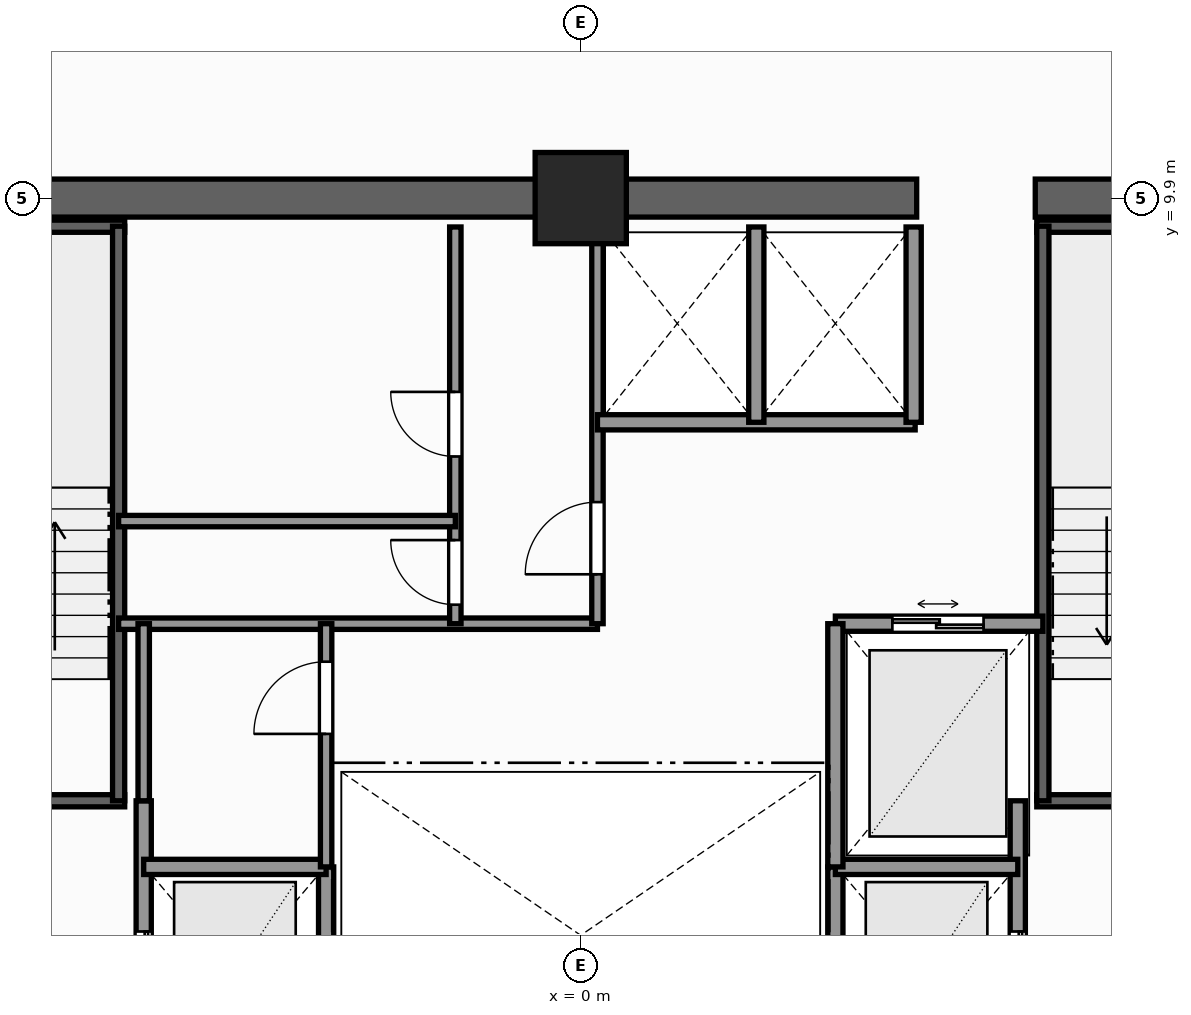
"""IFC4 building model, lengths in metres.
Left out: names, types, materials, properties, quantities, classifications, styles, units other than length and angle.
Written with IfcOpenShell. Run it as: python <this file> out.ifc"""

import sys

from ifc_helpers import new_model, si_unit, direction, frame, frame_2d, origin, origin_2d, place, context, subcontext, project, spatial, rectangle, extrude, element, fill, save


model = new_model("IFC4")
c1 = context("Model", 3, precision=1e-05, world=origin(), true_north=direction((0.0, 1.0)))
c2 = subcontext(c1, "Body", "Model", "MODEL_VIEW")
j1 = project(units=[si_unit("LENGTHUNIT", "METRE"), si_unit("PLANEANGLEUNIT", "RADIAN")], contexts=[c1])
p1 = place(None, origin())
s1 = spatial("IfcSite", under=j1, at=p1, CompositionType="ELEMENT")
p2 = place(p1, origin())
s2 = spatial("IfcBuilding", under=s1, at=p2, CompositionType="ELEMENT")
p3 = place(p2, frame((0.0, 0.0, 131.6)))
s3 = spatial("IfcBuildingStorey", under=s2, at=p3, CompositionType="ELEMENT", Elevation=131.6)
p4 = place(p3, frame((-10.15, 9.9, 0.0), z_axis=(0.0, 0.0, 1.0), x_axis=(1.0, 0.0, 0.0)))
e1 = element("IfcWall", 1, at=p4, inside=s3, PredefinedType="SHEAR", context=c2, shape_type="SweptSolid", body=[
    extrude(rectangle(XDim=14.57, YDim=0.5, at=frame_2d((7.285, 0.0))), origin(), (0.0, 0.0, 1.0), 3.3),
])
p5 = place(p3, frame((5.98, 9.9, 0.0), z_axis=(0.0, 0.0, 1.0), x_axis=(1.0, 0.0, 0.0)))
e2 = element("IfcWall", 2, at=p5, inside=s3, PredefinedType="SHEAR", context=c2, shape_type="SweptSolid", body=[
    extrude(rectangle(XDim=4.17, YDim=0.5, at=frame_2d((2.085, 0.0))), origin(), (0.0, 0.0, 1.0), 3.3),
])
p6 = place(p3, frame((0.0, 9.9, 0.0), z_axis=(0.0, 0.0, 1.0), x_axis=(1.0, 0.0, 0.0)))
e3 = element("IfcColumn", 3, at=p6, inside=s3, PredefinedType="COLUMN", context=c2, shape_type="SweptSolid", body=[
    extrude(rectangle(XDim=1.2, YDim=1.2, at=origin_2d()), origin(), (0.0, 0.0, 1.0), 3.3),
])
p7 = place(p3, frame((-9.52, 1.97, 0.0), z_axis=(0.0, 0.0, 1.0), x_axis=(1.0, 0.0, 0.0)))
e4 = element("IfcWall", 4, at=p7, inside=s3, PredefinedType="SHEAR", context=c2, shape_type="SweptSolid", body=[
    extrude(rectangle(XDim=3.52, YDim=0.16, at=frame_2d((1.76, 0.0))), origin(), (0.0, 0.0, 1.0), 3.3),
])
p8 = place(p7, frame((1.15, 0.0, 0.0)))
e5 = element("IfcOpeningElement", 5, at=p8, cuts=e4, PredefinedType="OPENING", context=c2, shape_type="SweptSolid", body=[
    extrude(rectangle(XDim=1.1, YDim=2.2, at=frame_2d((0.55, 1.1))), frame((0.0, 0.09, 0.0), z_axis=(0.0, -1.0, 0.0), x_axis=(1.0, 0.0, 0.0)), (0.0, 0.0, 1.0), 0.18),
])
p9 = place(p3, frame((-9.52, 9.53, 0.0), z_axis=(0.0, 0.0, 1.0), x_axis=(1.0, 0.0, 0.0)))
e6 = element("IfcWall", 6, at=p9, inside=s3, PredefinedType="SHEAR", context=c2, shape_type="SweptSolid", body=[
    extrude(rectangle(XDim=3.52, YDim=0.16, at=frame_2d((1.76, 0.0))), origin(), (0.0, 0.0, 1.0), 3.3),
])
p10 = place(p3, frame((-6.08, 1.97, 0.0), z_axis=(0.0, 0.0, 1.0), x_axis=(0.0, 1.0, 0.0)))
e7 = element("IfcWall", 7, at=p10, inside=s3, PredefinedType="SHEAR", context=c2, shape_type="SweptSolid", body=[
    extrude(rectangle(XDim=7.56, YDim=0.16, at=frame_2d((3.78, 0.0))), origin(), (0.0, 0.0, 1.0), 3.3),
])
p11 = place(p3, frame((6.0, 1.97, 0.0), z_axis=(0.0, 0.0, 1.0), x_axis=(1.0, 0.0, 0.0)))
e8 = element("IfcWall", 8, at=p11, inside=s3, PredefinedType="SHEAR", context=c2, shape_type="SweptSolid", body=[
    extrude(rectangle(XDim=3.52, YDim=0.16, at=frame_2d((1.76, 0.0))), origin(), (0.0, 0.0, 1.0), 3.3),
])
p12 = place(p11, frame((1.15, 0.0, 0.0)))
e9 = element("IfcOpeningElement", 9, at=p12, cuts=e8, PredefinedType="OPENING", context=c2, shape_type="SweptSolid", body=[
    extrude(rectangle(XDim=1.1, YDim=2.2, at=frame_2d((0.55, 1.1))), frame((0.0, 0.09, 0.0), z_axis=(0.0, -1.0, 0.0), x_axis=(1.0, 0.0, 0.0)), (0.0, 0.0, 1.0), 0.18),
])
p13 = place(p3, frame((6.0, 9.53, 0.0), z_axis=(0.0, 0.0, 1.0), x_axis=(1.0, 0.0, 0.0)))
e10 = element("IfcWall", 10, at=p13, inside=s3, PredefinedType="SHEAR", context=c2, shape_type="SweptSolid", body=[
    extrude(rectangle(XDim=3.52, YDim=0.16, at=frame_2d((1.76, 0.0))), origin(), (0.0, 0.0, 1.0), 3.3),
])
p14 = place(p3, frame((6.08, 1.97, 0.0), z_axis=(0.0, 0.0, 1.0), x_axis=(0.0, 1.0, 0.0)))
e11 = element("IfcWall", 11, at=p14, inside=s3, PredefinedType="SHEAR", context=c2, shape_type="SweptSolid", body=[
    extrude(rectangle(XDim=7.56, YDim=0.16, at=frame_2d((3.78, 0.0))), origin(), (0.0, 0.0, 1.0), 3.3),
])
p15 = place(p3, frame((-5.75, -3.6, 0.0), z_axis=(0.0, 0.0, 1.0), x_axis=(0.0, 1.0, 0.0)))
e12 = element("IfcWall", 12, at=p15, inside=s3, PredefinedType="SOLIDWALL", context=c2, shape_type="SweptSolid", body=[
    extrude(rectangle(XDim=5.57, YDim=0.2, at=frame_2d((2.785, 0.0))), origin(), (0.0, 0.0, 1.0), 2.735),
])
p16 = place(p15, frame((2.75, 0.0, 0.0)))
e13 = element("IfcOpeningElement", 13, at=p16, cuts=e12, PredefinedType="OPENING", context=c2, shape_type="SweptSolid", body=[
    extrude(rectangle(XDim=1.1, YDim=2.2, at=frame_2d((0.55, 1.1))), frame((0.0, 0.11, 0.0), z_axis=(0.0, -1.0, 0.0), x_axis=(1.0, 0.0, 0.0)), (0.0, 0.0, 1.0), 0.22),
])
p17 = place(p3, frame((-3.35, -1.7, 0.0), z_axis=(0.0, 0.0, 1.0), x_axis=(0.0, 1.0, 0.0)))
e14 = element("IfcWall", 14, at=p17, inside=s3, PredefinedType="SOLIDWALL", context=c2, shape_type="SweptSolid", body=[
    extrude(rectangle(XDim=2.8, YDim=0.2, at=frame_2d((1.4, 0.0))), origin(), (0.0, 0.0, 1.0), 2.735),
])
p18 = place(p3, frame((-5.75, 1.1, 0.0), z_axis=(0.0, 0.0, 1.0), x_axis=(1.0, 0.0, 0.0)))
e15 = element("IfcWall", 15, at=p18, inside=s3, PredefinedType="SOLIDWALL", context=c2, shape_type="SweptSolid", body=[
    extrude(rectangle(XDim=2.4, YDim=0.2, at=frame_2d((1.2, 0.0))), origin(), (0.0, 0.0, 1.0), 3.1),
])
p19 = place(p3, frame((5.75, -3.6, 0.0), z_axis=(0.0, 0.0, 1.0), x_axis=(0.0, 1.0, 0.0)))
e16 = element("IfcWall", 16, at=p19, inside=s3, PredefinedType="SOLIDWALL", context=c2, shape_type="SweptSolid", body=[
    extrude(rectangle(XDim=5.57, YDim=0.2, at=frame_2d((2.785, 0.0))), origin(), (0.0, 0.0, 1.0), 2.735),
])
p20 = place(p19, frame((2.75, 0.0, 0.0)))
e17 = element("IfcOpeningElement", 17, at=p20, cuts=e16, PredefinedType="OPENING", context=c2, shape_type="SweptSolid", body=[
    extrude(rectangle(XDim=1.1, YDim=2.2, at=frame_2d((0.55, 1.1))), frame((0.0, 0.11, 0.0), z_axis=(0.0, -1.0, 0.0), x_axis=(1.0, 0.0, 0.0)), (0.0, 0.0, 1.0), 0.22),
])
p21 = place(p3, frame((3.35, -1.7, 0.0), z_axis=(0.0, 0.0, 1.0), x_axis=(0.0, 1.0, 0.0)))
e18 = element("IfcWall", 18, at=p21, inside=s3, PredefinedType="SOLIDWALL", context=c2, shape_type="SweptSolid", body=[
    extrude(rectangle(XDim=2.8, YDim=0.2, at=frame_2d((1.4, 0.0))), origin(), (0.0, 0.0, 1.0), 2.735),
])
p22 = place(p3, frame((3.35, 1.1, 0.0), z_axis=(0.0, 0.0, 1.0), x_axis=(1.0, 0.0, 0.0)))
e19 = element("IfcWall", 19, at=p22, inside=s3, PredefinedType="SOLIDWALL", context=c2, shape_type="SweptSolid", body=[
    extrude(rectangle(XDim=2.4, YDim=0.2, at=frame_2d((1.2, 0.0))), origin(), (0.0, 0.0, 1.0), 3.1),
])
p23 = place(p3, frame((3.35, 4.3, 0.0), z_axis=(0.0, 0.0, 1.0), x_axis=(1.0, 0.0, 0.0)))
e20 = element("IfcWall", 20, at=p23, inside=s3, PredefinedType="SOLIDWALL", context=c2, shape_type="SweptSolid", body=[
    extrude(rectangle(XDim=2.73, YDim=0.2, at=frame_2d((1.365, 0.0))), origin(), (0.0, 0.0, 1.0), 3.1),
])
p24 = place(p23, frame((0.75, 0.0, 0.0)))
e21 = element("IfcOpeningElement", 21, at=p24, cuts=e20, PredefinedType="OPENING", context=c2, shape_type="SweptSolid", body=[
    extrude(rectangle(XDim=1.2, YDim=2.25, at=frame_2d((0.6, 1.125))), frame((0.0, 0.11, 0.0), z_axis=(0.0, -1.0, 0.0), x_axis=(1.0, 0.0, 0.0)), (0.0, 0.0, 1.0), 0.22),
])
p25 = place(p3, frame((3.35, 1.1, 0.0), z_axis=(0.0, 0.0, 1.0), x_axis=(0.0, 1.0, 0.0)))
e22 = element("IfcWall", 22, at=p25, inside=s3, PredefinedType="SOLIDWALL", context=c2, shape_type="SweptSolid", body=[
    extrude(rectangle(XDim=3.2, YDim=0.2, at=frame_2d((1.6, 0.0))), origin(), (0.0, 0.0, 1.0), 2.735),
])
p26 = place(p3, frame((-6.08, 4.3, 0.0), z_axis=(0.0, 0.0, 1.0), x_axis=(1.0, 0.0, 0.0)))
e23 = element("IfcWall", 23, at=p26, inside=s3, PredefinedType="PARTITIONING", context=c2, shape_type="SweptSolid", body=[
    extrude(rectangle(XDim=6.3, YDim=0.15, at=frame_2d((3.15, 0.0))), origin(), (0.0, 0.0, 1.0), 3.1),
])
p27 = place(p3, frame((0.22, 4.3, 0.0), z_axis=(0.0, 0.0, 1.0), x_axis=(0.0, 1.0, 0.0)))
e24 = element("IfcWall", 24, at=p27, inside=s3, PredefinedType="PARTITIONING", context=c2, shape_type="SweptSolid", body=[
    extrude(rectangle(XDim=5.22, YDim=0.15, at=frame_2d((2.61, 0.0))), origin(), (0.0, 0.0, 1.0), 3.1),
])
p28 = place(p27, frame((0.65, 0.0, 0.0)))
e25 = element("IfcOpeningElement", 25, at=p28, cuts=e24, PredefinedType="OPENING", context=c2, shape_type="SweptSolid", body=[
    extrude(rectangle(XDim=0.95, YDim=2.06, at=frame_2d((0.475, 1.03))), frame((0.0, 0.085, 0.0), z_axis=(0.0, -1.0, 0.0), x_axis=(1.0, 0.0, 0.0)), (0.0, 0.0, 1.0), 0.17),
])
p29 = place(p3, frame((-1.65, 4.3, 0.0), z_axis=(0.0, 0.0, 1.0), x_axis=(0.0, 1.0, 0.0)))
e26 = element("IfcWall", 26, at=p29, inside=s3, PredefinedType="PARTITIONING", context=c2, shape_type="SweptSolid", body=[
    extrude(rectangle(XDim=5.22, YDim=0.15, at=frame_2d((2.61, 0.0))), origin(), (0.0, 0.0, 1.0), 3.1),
])
p30 = place(p29, frame((2.2, 0.0, 0.0)))
e27 = element("IfcOpeningElement", 27, at=p30, cuts=e26, PredefinedType="OPENING", context=c2, shape_type="SweptSolid", body=[
    extrude(rectangle(XDim=0.85, YDim=2.03, at=frame_2d((0.425, 1.015))), frame((0.0, 0.085, 0.0), z_axis=(0.0, -1.0, 0.0), x_axis=(1.0, 0.0, 0.0)), (0.0, 0.0, 1.0), 0.17),
])
p31 = place(p29, frame((0.25, 0.0, 0.0)))
e28 = element("IfcOpeningElement", 28, at=p31, cuts=e26, PredefinedType="OPENING", context=c2, shape_type="SweptSolid", body=[
    extrude(rectangle(XDim=0.85, YDim=2.03, at=frame_2d((0.425, 1.015))), frame((0.0, 0.085, 0.0), z_axis=(0.0, -1.0, 0.0), x_axis=(1.0, 0.0, 0.0)), (0.0, 0.0, 1.0), 0.17),
])
p32 = place(p3, frame((-6.08, 5.65, 0.0), z_axis=(0.0, 0.0, 1.0), x_axis=(1.0, 0.0, 0.0)))
e29 = element("IfcWall", 29, at=p32, inside=s3, PredefinedType="PARTITIONING", context=c2, shape_type="SweptSolid", body=[
    extrude(rectangle(XDim=4.43, YDim=0.15, at=frame_2d((2.215, 0.0))), origin(), (0.0, 0.0, 1.0), 3.1),
])
p33 = place(p3, frame((0.22, 6.95, 0.0), z_axis=(0.0, 0.0, 1.0), x_axis=(1.0, 0.0, 0.0)))
e30 = element("IfcWall", 30, at=p33, inside=s3, PredefinedType="SOLIDWALL", context=c2, shape_type="SweptSolid", body=[
    extrude(rectangle(XDim=4.18, YDim=0.2, at=frame_2d((2.09, 0.0))), origin(), (0.0, 0.0, 1.0), 3.1),
])
for number, where, z_axis, x_axis in (
    (31, (4.38, 6.95, 0.0), (0.0, 0.0, 1.0), (0.0, 1.0, 0.0)),
    (32, (2.31, 6.95, 0.0), (0.0, 0.0, 1.0), (0.0, 1.0, 0.0)),
):
    element("IfcWall", number, at=place(p3, frame(where, z_axis=z_axis, x_axis=x_axis)), inside=s3, PredefinedType="SOLIDWALL", context=c2, shape_type="SweptSolid", body=[
        extrude(rectangle(XDim=2.57, YDim=0.2, at=frame_2d((1.285, 0.0))), origin(), (0.0, 0.0, 1.0), 3.1),
    ])
p34 = place(p3, frame((-3.35, 1.1, 0.0), z_axis=(0.0, 0.0, 1.0), x_axis=(0.0, 1.0, 0.0)))
e33 = element("IfcWall", 33, at=p34, inside=s3, PredefinedType="PARTITIONING", context=c2, shape_type="SweptSolid", body=[
    extrude(rectangle(XDim=3.2, YDim=0.15, at=frame_2d((1.6, 0.0))), origin(), (0.0, 0.0, 1.0), 2.735),
])
p35 = place(p34, frame((1.75, 0.0, 0.0)))
e34 = element("IfcOpeningElement", 34, at=p35, cuts=e33, PredefinedType="OPENING", context=c2, shape_type="SweptSolid", body=[
    extrude(rectangle(XDim=0.95, YDim=2.06, at=frame_2d((0.475, 1.03))), frame((0.0, 0.085, 0.0), z_axis=(0.0, -1.0, 0.0), x_axis=(1.0, 0.0, 0.0)), (0.0, 0.0, 1.0), 0.17),
])
p36 = place(p3, frame((-5.75, 1.97, 0.0), z_axis=(0.0, 0.0, 1.0), x_axis=(0.0, 1.0, 0.0)))
e35 = element("IfcWall", 35, at=p36, inside=s3, PredefinedType="PARTITIONING", context=c2, shape_type="SweptSolid", body=[
    extrude(rectangle(XDim=2.33, YDim=0.15, at=frame_2d((1.165, 0.0))), origin(), (0.0, 0.0, 1.0), 2.735),
])
p37 = place(p16, origin())
e36 = element("IfcDoor", 36, at=p37, inside=s3, OperationType="DOUBLE_DOOR_SLIDING", PredefinedType="DOOR", context=c2, shape_type="SweptSolid", body=[
    extrude(rectangle(XDim=1.1, YDim=2.2, at=frame_2d((0.55, 1.1))), frame((0.0, 0.025, 0.0), z_axis=(0.0, -1.0, 0.0), x_axis=(1.0, 0.0, 0.0)), (0.0, 0.0, 1.0), 0.05),
])
fill(e13, e36)
p38 = place(p20, origin())
e37 = element("IfcDoor", 37, at=p38, inside=s3, OperationType="DOUBLE_DOOR_SLIDING", PredefinedType="DOOR", context=c2, shape_type="SweptSolid", body=[
    extrude(rectangle(XDim=1.1, YDim=2.2, at=frame_2d((0.55, 1.1))), frame((0.0, 0.025, 0.0), z_axis=(0.0, -1.0, 0.0), x_axis=(1.0, 0.0, 0.0)), (0.0, 0.0, 1.0), 0.05),
])
fill(e17, e37)
p39 = place(p24, origin())
e38 = element("IfcDoor", 38, at=p39, inside=s3, OperationType="DOUBLE_DOOR_SLIDING", PredefinedType="DOOR", context=c2, shape_type="SweptSolid", body=[
    extrude(rectangle(XDim=1.2, YDim=2.25, at=frame_2d((0.6, 1.125))), frame((0.0, 0.025, 0.0), z_axis=(0.0, -1.0, 0.0), x_axis=(1.0, 0.0, 0.0)), (0.0, 0.0, 1.0), 0.05),
])
fill(e21, e38)
p40 = place(p28, origin())
e39 = element("IfcDoor", 39, at=p40, inside=s3, OperationType="SINGLE_SWING_LEFT", PredefinedType="DOOR", context=c2, shape_type="SweptSolid", body=[
    extrude(rectangle(XDim=0.95, YDim=2.06, at=frame_2d((0.475, 1.03))), frame((0.0, 0.025, 0.0), z_axis=(0.0, -1.0, 0.0), x_axis=(1.0, 0.0, 0.0)), (0.0, 0.0, 1.0), 0.05),
])
fill(e25, e39)
p41 = place(p30, origin())
e40 = element("IfcDoor", 40, at=p41, inside=s3, OperationType="SINGLE_SWING_RIGHT", PredefinedType="DOOR", context=c2, shape_type="SweptSolid", body=[
    extrude(rectangle(XDim=0.85, YDim=2.03, at=frame_2d((0.425, 1.015))), frame((0.0, 0.025, 0.0), z_axis=(0.0, -1.0, 0.0), x_axis=(1.0, 0.0, 0.0)), (0.0, 0.0, 1.0), 0.05),
])
fill(e27, e40)
p42 = place(p31, origin())
e41 = element("IfcDoor", 41, at=p42, inside=s3, OperationType="SINGLE_SWING_RIGHT", PredefinedType="DOOR", context=c2, shape_type="SweptSolid", body=[
    extrude(rectangle(XDim=0.85, YDim=2.03, at=frame_2d((0.425, 1.015))), frame((0.0, 0.025, 0.0), z_axis=(0.0, -1.0, 0.0), x_axis=(1.0, 0.0, 0.0)), (0.0, 0.0, 1.0), 0.05),
])
fill(e28, e41)
p43 = place(p35, origin())
e42 = element("IfcDoor", 42, at=p43, inside=s3, OperationType="SINGLE_SWING_LEFT", PredefinedType="DOOR", context=c2, shape_type="SweptSolid", body=[
    extrude(rectangle(XDim=0.95, YDim=2.06, at=frame_2d((0.475, 1.03))), frame((0.0, 0.025, 0.0), z_axis=(0.0, -1.0, 0.0), x_axis=(1.0, 0.0, 0.0)), (0.0, 0.0, 1.0), 0.05),
])
fill(e34, e42)
save(model, sys.argv[1])
